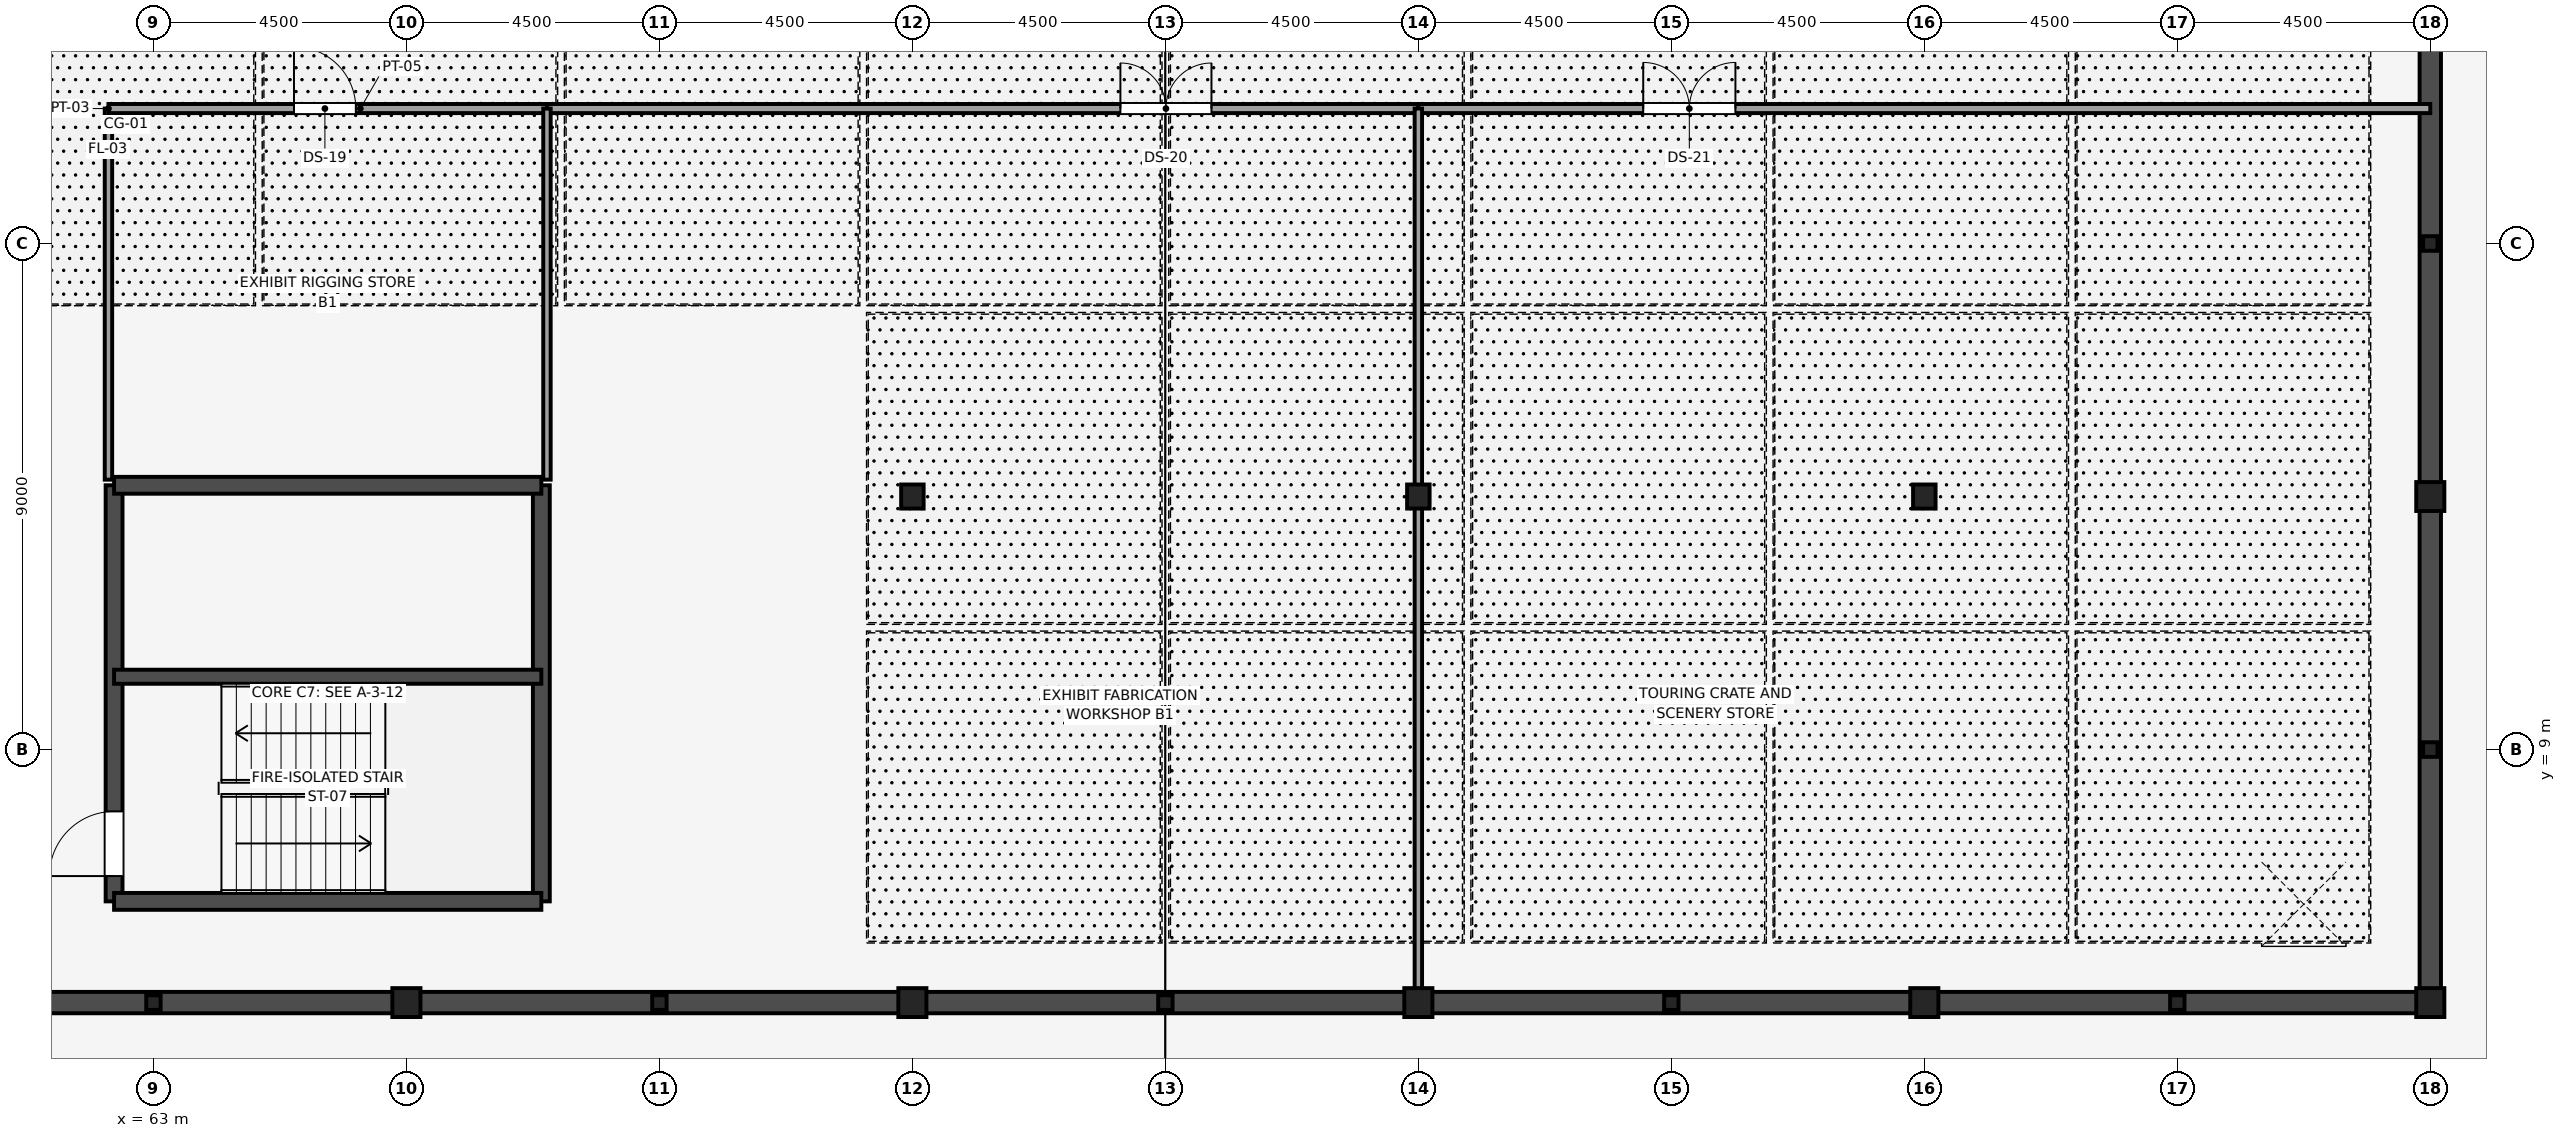
"""IFC4 building model, lengths in metres.
Left out: names, types, materials, properties, quantities, classifications, styles, units other than length and angle.
Written with IfcOpenShell. Run it as: python <this file> out.ifc"""

import sys

from ifc_helpers import new_model, si_unit, direction, frame, frame_2d, origin, origin_2d, place, context, subcontext, project, spatial, rectangle, i_section, extrude, element, fill, save


model = new_model("IFC4")
c1 = context("Model", 3, precision=1e-05, world=origin(), true_north=direction((0.0, 1.0)))
c2 = subcontext(c1, "Body", "Model", "MODEL_VIEW")
j1 = project(units=[si_unit("LENGTHUNIT", "METRE"), si_unit("PLANEANGLEUNIT", "RADIAN")], contexts=[c1])
p1 = place(None, origin())
s1 = spatial("IfcSite", under=j1, at=p1, CompositionType="ELEMENT")
p2 = place(p1, origin())
s2 = spatial("IfcBuilding", under=s1, at=p2, CompositionType="ELEMENT")
p3 = place(p2, frame((0.0, 0.0, -4.5)))
s3 = spatial("IfcBuildingStorey", under=s2, at=p3, CompositionType="ELEMENT", Elevation=-4.5)
for number, where, z_axis, x_axis in (
    (1, (67.5, 4.5, 0.0), (0.0, 0.0, 1.0), (1.0, 0.0, 0.0)),
    (2, (76.5, 4.5, 0.0), (0.0, 0.0, 1.0), (1.0, 0.0, 0.0)),
):
    element("IfcColumn", number, at=place(p3, frame(where, z_axis=z_axis, x_axis=x_axis)), inside=s3, PredefinedType="COLUMN", context=c2, shape_type="SweptSolid", body=[
        extrude(i_section(OverallWidth=0.5, OverallDepth=0.514, WebThickness=0.022, FlangeThickness=0.032, FilletRadius=0.016, at=origin_2d()), origin(), (0.0, 0.0, 1.0), 4.5),
    ])
p4 = place(p3, frame((76.5, 13.5, 0.0), z_axis=(0.0, 0.0, 1.0), x_axis=(1.0, 0.0, 0.0)))
e3 = element("IfcColumn", 3, at=p4, inside=s3, PredefinedType="COLUMN", context=c2, shape_type="SweptSolid", body=[
    extrude(i_section(OverallWidth=0.4, OverallDepth=0.428, WebThickness=0.02, FlangeThickness=0.028, FilletRadius=0.016, at=origin_2d()), origin(), (0.0, 0.0, 1.0), 4.5),
])
p5 = place(p3, frame((85.5, 4.5, 0.0), z_axis=(0.0, 0.0, 1.0), x_axis=(1.0, 0.0, 0.0)))
e4 = element("IfcColumn", 4, at=p5, inside=s3, PredefinedType="COLUMN", context=c2, shape_type="SweptSolid", body=[
    extrude(i_section(OverallWidth=0.5, OverallDepth=0.514, WebThickness=0.022, FlangeThickness=0.032, FilletRadius=0.016, at=origin_2d()), origin(), (0.0, 0.0, 1.0), 4.5),
])
p6 = place(p3, frame((85.5, 13.5, 0.0), z_axis=(0.0, 0.0, 1.0), x_axis=(1.0, 0.0, 0.0)))
e5 = element("IfcColumn", 5, at=p6, inside=s3, PredefinedType="COLUMN", context=c2, shape_type="SweptSolid", body=[
    extrude(i_section(OverallWidth=0.4, OverallDepth=0.428, WebThickness=0.02, FlangeThickness=0.028, FilletRadius=0.016, at=origin_2d()), origin(), (0.0, 0.0, 1.0), 4.5),
])
p7 = place(p3, frame((94.5, 4.5, 0.0), z_axis=(0.0, 0.0, 1.0), x_axis=(1.0, 0.0, 0.0)))
e6 = element("IfcColumn", 6, at=p7, inside=s3, PredefinedType="COLUMN", context=c2, shape_type="SweptSolid", body=[
    extrude(i_section(OverallWidth=0.5, OverallDepth=0.514, WebThickness=0.022, FlangeThickness=0.032, FilletRadius=0.016, at=origin_2d()), origin(), (0.0, 0.0, 1.0), 4.5),
])
p8 = place(p3, frame((94.5, 13.5, 0.0), z_axis=(0.0, 0.0, 1.0), x_axis=(1.0, 0.0, 0.0)))
e7 = element("IfcColumn", 7, at=p8, inside=s3, PredefinedType="COLUMN", context=c2, shape_type="SweptSolid", body=[
    extrude(i_section(OverallWidth=0.4, OverallDepth=0.428, WebThickness=0.02, FlangeThickness=0.028, FilletRadius=0.016, at=origin_2d()), origin(), (0.0, 0.0, 1.0), 4.5),
])
for number, where, z_axis, x_axis in (
    (8, (103.5, 4.5, 0.0), (0.0, 0.0, 1.0), (1.0, 0.0, 0.0)),
    (9, (103.5, 13.5, 0.0), (0.0, 0.0, 1.0), (1.0, 0.0, 0.0)),
):
    element("IfcColumn", number, at=place(p3, frame(where, z_axis=z_axis, x_axis=x_axis)), inside=s3, PredefinedType="COLUMN", context=c2, shape_type="SweptSolid", body=[
        extrude(i_section(OverallWidth=0.5, OverallDepth=0.514, WebThickness=0.022, FlangeThickness=0.032, FilletRadius=0.016, at=origin_2d()), origin(), (0.0, 0.0, 1.0), 4.5),
    ])
for number, where, z_axis, x_axis in (
    (10, (63.0, 4.5, 0.0), (0.0, 0.0, 1.0), (1.0, 0.0, 0.0)),
    (11, (72.0, 4.5, 0.0), (0.0, 0.0, 1.0), (1.0, 0.0, 0.0)),
    (12, (81.0, 4.5, 0.0), (0.0, 0.0, 1.0), (1.0, 0.0, 0.0)),
    (13, (90.0, 4.5, 0.0), (0.0, 0.0, 1.0), (1.0, 0.0, 0.0)),
    (14, (99.0, 4.5, 0.0), (0.0, 0.0, 1.0), (1.0, 0.0, 0.0)),
    (15, (103.5, 9.0, 0.0), (0.0, 0.0, 1.0), (1.0, 0.0, 0.0)),
    (16, (103.5, 18.0, 0.0), (0.0, 0.0, 1.0), (1.0, 0.0, 0.0)),
):
    element("IfcColumn", number, at=place(p3, frame(where, z_axis=z_axis, x_axis=x_axis)), inside=s3, PredefinedType="PILASTER", context=c2, shape_type="SweptSolid", body=[
        extrude(i_section(OverallWidth=0.256, OverallDepth=0.26, WebThickness=0.01, FlangeThickness=0.017, FilletRadius=0.014, at=origin_2d()), origin(), (0.0, 0.0, 1.0), 4.5),
    ])
p9 = place(p3, frame((62.3, 6.3, 0.0), z_axis=(0.0, 0.0, 1.0), x_axis=(0.0, 1.0, 0.0)))
e17 = element("IfcWall", 17, at=p9, inside=s3, PredefinedType="SHEAR", context=c2, shape_type="SweptSolid", body=[
    extrude(rectangle(XDim=7.4, YDim=0.3, at=frame_2d((3.7, 0.0))), origin(), (0.0, 0.0, 1.0), 4.5),
])
p10 = place(p9, frame((0.45, 0.0, 0.0)))
e18 = element("IfcOpeningElement", 18, at=p10, cuts=e17, PredefinedType="OPENING", context=c2, shape_type="SweptSolid", body=[
    extrude(rectangle(XDim=1.15, YDim=2.15, at=frame_2d((0.575, 1.075))), frame((0.0, 0.16, 0.0), z_axis=(0.0, -1.0, 0.0), x_axis=(1.0, 0.0, 0.0)), (0.0, 0.0, 1.0), 0.32),
])
p11 = place(p3, frame((69.9, 6.3, 0.0), z_axis=(0.0, 0.0, 1.0), x_axis=(0.0, 1.0, 0.0)))
e19 = element("IfcWall", 19, at=p11, inside=s3, PredefinedType="SHEAR", context=c2, shape_type="SweptSolid", body=[
    extrude(rectangle(XDim=7.4, YDim=0.3, at=frame_2d((3.7, 0.0))), origin(), (0.0, 0.0, 1.0), 4.5),
])
for number, where, z_axis, x_axis in (
    (20, (62.3, 6.3, 0.0), (0.0, 0.0, 1.0), (1.0, 0.0, 0.0)),
    (21, (62.3, 13.7, 0.0), (0.0, 0.0, 1.0), (1.0, 0.0, 0.0)),
):
    element("IfcWall", number, at=place(p3, frame(where, z_axis=z_axis, x_axis=x_axis)), inside=s3, PredefinedType="SHEAR", context=c2, shape_type="SweptSolid", body=[
        extrude(rectangle(XDim=7.6, YDim=0.3, at=frame_2d((3.8, 0.0))), origin(), (0.0, 0.0, 1.0), 4.5),
    ])
p12 = place(p3, frame((62.3, 10.295, 0.0), z_axis=(0.0, 0.0, 1.0), x_axis=(1.0, 0.0, 0.0)))
e22 = element("IfcWall", 22, at=p12, inside=s3, PredefinedType="SHEAR", context=c2, shape_type="SweptSolid", body=[
    extrude(rectangle(XDim=7.6, YDim=0.25, at=frame_2d((3.8, 0.0))), origin(), (0.0, 0.0, 1.0), 4.5),
])
p13 = place(p3, frame((58.5, 4.5, 0.0), z_axis=(0.0, 0.0, 1.0), x_axis=(1.0, 0.0, 0.0)))
e23 = element("IfcWall", 23, at=p13, inside=s3, PredefinedType="SHEAR", context=c2, shape_type="SweptSolid", body=[
    extrude(rectangle(XDim=45.0, YDim=0.38, at=frame_2d((22.5, 0.0))), origin(), (0.0, 0.0, 1.0), 4.26),
])
p14 = place(p3, frame((103.5, 4.5, 0.0), z_axis=(0.0, 0.0, 1.0), x_axis=(0.0, 1.0, 0.0)))
e24 = element("IfcWall", 24, at=p14, inside=s3, PredefinedType="SHEAR", context=c2, shape_type="SweptSolid", body=[
    extrude(rectangle(XDim=36.0, YDim=0.38, at=frame_2d((18.0, 0.0))), origin(), (0.0, 0.0, 1.0), 4.26),
])
p15 = place(p3, frame((62.2, 13.8, 0.0), z_axis=(0.0, 0.0, 1.0), x_axis=(0.0, 1.0, 0.0)))
e25 = element("IfcWall", 25, at=p15, inside=s3, PredefinedType="PARTITIONING", context=c2, shape_type="SweptSolid", body=[
    extrude(rectangle(XDim=6.6, YDim=0.132, at=frame_2d((3.3, 0.0))), origin(), (0.0, 0.0, 1.0), 4.26),
])
p16 = place(p3, frame((62.2, 20.4, 0.0), z_axis=(0.0, 0.0, 1.0), x_axis=(1.0, 0.0, 0.0)))
e26 = element("IfcWall", 26, at=p16, inside=s3, PredefinedType="PARTITIONING", context=c2, shape_type="SweptSolid", body=[
    extrude(rectangle(XDim=7.8, YDim=0.162, at=frame_2d((3.9, 0.0))), origin(), (0.0, 0.0, 1.0), 4.26),
])
p17 = place(p16, frame((3.3, 0.0, 0.0)))
e27 = element("IfcOpeningElement", 27, at=p17, cuts=e26, PredefinedType="OPENING", context=c2, shape_type="SweptSolid", body=[
    extrude(rectangle(XDim=1.1, YDim=2.175, at=frame_2d((0.55, 1.087))), frame((0.0, 0.091, 0.0), z_axis=(0.0, -1.0, 0.0), x_axis=(1.0, 0.0, 0.0)), (0.0, 0.0, 1.0), 0.182),
])
p18 = place(p3, frame((70.0, 20.4, 0.0), z_axis=(0.0, 0.0, 1.0), x_axis=(1.0, 0.0, 0.0)))
e28 = element("IfcWall", 28, at=p18, inside=s3, PredefinedType="PARTITIONING", context=c2, shape_type="SweptSolid", body=[
    extrude(rectangle(XDim=15.5, YDim=0.162, at=frame_2d((7.75, 0.0))), origin(), (0.0, 0.0, 1.0), 4.26),
])
p19 = place(p18, frame((10.2, 0.0, 0.0)))
e29 = element("IfcOpeningElement", 29, at=p19, cuts=e28, PredefinedType="OPENING", context=c2, shape_type="SweptSolid", body=[
    extrude(rectangle(XDim=1.62, YDim=2.225, at=frame_2d((0.81, 1.113))), frame((0.0, 0.091, 0.0), z_axis=(0.0, -1.0, 0.0), x_axis=(1.0, 0.0, 0.0)), (0.0, 0.0, 1.0), 0.182),
])
p20 = place(p3, frame((85.5, 20.4, 0.0), z_axis=(0.0, 0.0, 1.0), x_axis=(1.0, 0.0, 0.0)))
e30 = element("IfcWall", 30, at=p20, inside=s3, PredefinedType="PARTITIONING", context=c2, shape_type="SweptSolid", body=[
    extrude(rectangle(XDim=18.0, YDim=0.162, at=frame_2d((9.0, 0.0))), origin(), (0.0, 0.0, 1.0), 4.26),
])
p21 = place(p20, frame((4.0, 0.0, 0.0)))
e31 = element("IfcOpeningElement", 31, at=p21, cuts=e30, PredefinedType="OPENING", context=c2, shape_type="SweptSolid", body=[
    extrude(rectangle(XDim=1.64, YDim=2.225, at=frame_2d((0.82, 1.113))), frame((0.0, 0.091, 0.0), z_axis=(0.0, -1.0, 0.0), x_axis=(1.0, 0.0, 0.0)), (0.0, 0.0, 1.0), 0.182),
])
p22 = place(p3, frame((70.0, 13.8, 0.0), z_axis=(0.0, 0.0, 1.0), x_axis=(0.0, 1.0, 0.0)))
e32 = element("IfcWall", 32, at=p22, inside=s3, PredefinedType="PARTITIONING", context=c2, shape_type="SweptSolid", body=[
    extrude(rectangle(XDim=6.6, YDim=0.132, at=frame_2d((3.3, 0.0))), origin(), (0.0, 0.0, 1.0), 4.26),
])
p23 = place(p3, frame((85.5, 4.5, 0.0), z_axis=(0.0, 0.0, 1.0), x_axis=(0.0, 1.0, 0.0)))
e33 = element("IfcWall", 33, at=p23, inside=s3, PredefinedType="PARTITIONING", context=c2, shape_type="SweptSolid", body=[
    extrude(rectangle(XDim=15.9, YDim=0.132, at=frame_2d((7.95, 0.0))), origin(), (0.0, 0.0, 1.0), 3.712),
])
p24 = place(p10, origin())
e34 = element("IfcDoor", 34, at=p24, inside=s3, OperationType="SINGLE_SWING_LEFT", PredefinedType="DOOR", context=c2, shape_type="SweptSolid", body=[
    extrude(rectangle(XDim=1.15, YDim=2.15, at=frame_2d((0.575, 1.075))), frame((0.0, 0.025, 0.0), z_axis=(0.0, -1.0, 0.0), x_axis=(1.0, 0.0, 0.0)), (0.0, 0.0, 1.0), 0.05),
])
fill(e18, e34)
p25 = place(p17, origin())
e35 = element("IfcDoor", 35, at=p25, inside=s3, OperationType="SINGLE_SWING_LEFT", PredefinedType="DOOR", context=c2, shape_type="SweptSolid", body=[
    extrude(rectangle(XDim=1.1, YDim=2.175, at=frame_2d((0.55, 1.087))), frame((0.0, 0.025, 0.0), z_axis=(0.0, -1.0, 0.0), x_axis=(1.0, 0.0, 0.0)), (0.0, 0.0, 1.0), 0.05),
])
fill(e27, e35)
p26 = place(p19, origin())
e36 = element("IfcDoor", 36, at=p26, inside=s3, OperationType="DOUBLE_DOOR_SINGLE_SWING", PredefinedType="DOOR", context=c2, shape_type="SweptSolid", body=[
    extrude(rectangle(XDim=1.62, YDim=2.225, at=frame_2d((0.81, 1.113))), frame((0.0, 0.025, 0.0), z_axis=(0.0, -1.0, 0.0), x_axis=(1.0, 0.0, 0.0)), (0.0, 0.0, 1.0), 0.05),
])
fill(e29, e36)
p27 = place(p21, origin())
e37 = element("IfcDoor", 37, at=p27, inside=s3, OperationType="DOUBLE_DOOR_SINGLE_SWING", PredefinedType="DOOR", context=c2, shape_type="SweptSolid", body=[
    extrude(rectangle(XDim=1.64, YDim=2.225, at=frame_2d((0.82, 1.113))), frame((0.0, 0.025, 0.0), z_axis=(0.0, -1.0, 0.0), x_axis=(1.0, 0.0, 0.0)), (0.0, 0.0, 1.0), 0.05),
])
fill(e31, e37)
save(model, sys.argv[1])
